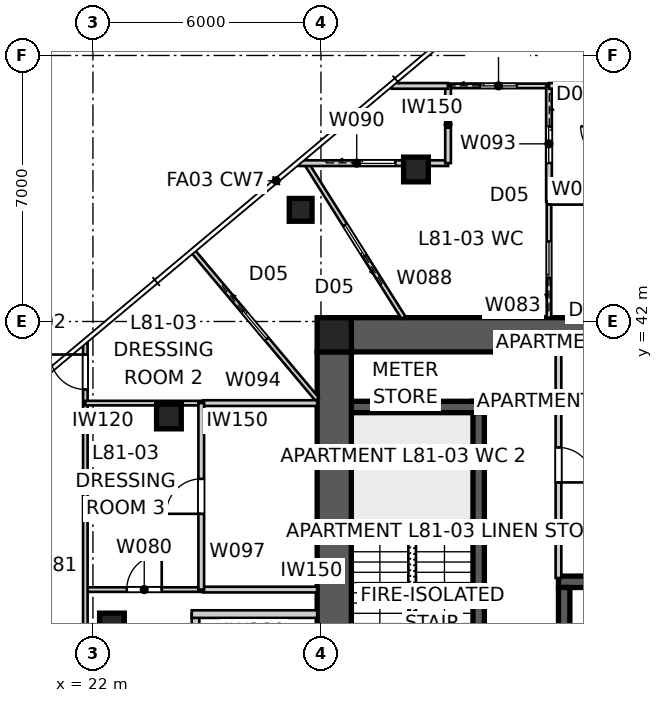
"""IFC4 building model, lengths in metres.
Left out: names, types, materials, properties, quantities, classifications, styles, units other than length and angle.
Written with IfcOpenShell. Run it as: python <this file> out.ifc"""

import sys

from ifc_helpers import new_model, si_unit, direction, frame, frame_2d, origin, origin_2d, place, context, subcontext, project, spatial, polyline, rectangle, outline, extrude, element, fill, save


model = new_model("IFC4")
c1 = context("Model", 3, precision=1e-05, world=origin(), true_north=direction((0.0, 1.0)))
c2 = subcontext(c1, "Body", "Model", "MODEL_VIEW")
j1 = project(units=[si_unit("LENGTHUNIT", "METRE"), si_unit("PLANEANGLEUNIT", "RADIAN")], contexts=[c1])
p1 = place(None, origin())
s1 = spatial("IfcSite", under=j1, at=p1, CompositionType="ELEMENT")
p2 = place(p1, origin())
s2 = spatial("IfcBuilding", under=s1, at=p2, CompositionType="ELEMENT")
p3 = place(p2, frame((0.0, 0.0, 293.0)))
s3 = spatial("IfcBuildingStorey", under=s2, at=p3, CompositionType="ELEMENT", Elevation=293.0)
p4 = place(p3, frame((28.8, 41.65, 0.0), z_axis=(0.0, 0.0, 1.0), x_axis=(1.0, 0.0, 0.0)))
e1 = element("IfcWall", 1, at=p4, inside=s3, PredefinedType="SHEAR", context=c2, shape_type="SweptSolid", body=[
    extrude(outline(polyline([(0.0, -0.45), (22.4, -0.45), (22.4, -0.025), (22.85, -0.025), (22.85, 0.025), (22.4, 0.025), (22.4, 0.45), (0.0, 0.45), (0.0, 0.025), (-0.45, 0.025), (-0.45, -0.025), (0.0, -0.025), (0.0, -0.45)])), origin(), (0.0, 0.0, 1.0), 3.4),
])
p5 = place(p3, frame((28.35, 41.2, 0.0), z_axis=(0.0, 0.0, 1.0), x_axis=(0.0, -1.0, 0.0)))
e2 = element("IfcWall", 2, at=p5, inside=s3, PredefinedType="SHEAR", context=c2, shape_type="SweptSolid", body=[
    extrude(outline(polyline([(0.0, -0.45), (22.4, -0.45), (22.4, -0.025), (22.85, -0.025), (22.85, 0.025), (22.4, 0.025), (22.4, 0.45), (0.0, 0.45), (0.0, 0.025), (-0.45, 0.025), (-0.45, -0.025), (0.0, -0.025), (0.0, -0.45)])), origin(), (0.0, 0.0, 1.0), 3.4),
])
p6 = place(p5, frame((11.14, 0.0, 0.0)))
e3 = element("IfcOpeningElement", 3, at=p6, cuts=e2, PredefinedType="OPENING", context=c2, shape_type="SweptSolid", body=[
    extrude(rectangle(XDim=1.02, YDim=2.4, at=frame_2d((0.51, 1.2))), frame((0.0, 0.46, 0.0), z_axis=(0.0, -1.0, 0.0), x_axis=(1.0, 0.0, 0.0)), (0.0, 0.0, 1.0), 0.92),
])
p7 = place(p3, frame((34.25, 35.15, 0.0), z_axis=(0.0, 0.0, 1.0), x_axis=(1.0, 0.0, 0.0)))
e4 = element("IfcWall", 4, at=p7, inside=s3, PredefinedType="SHEAR", context=c2, shape_type="SweptSolid", body=[
    extrude(rectangle(XDim=11.5, YDim=0.3, at=frame_2d((5.75, 0.0))), origin(), (0.0, 0.0, 1.0), 3.4),
])
p8 = place(p3, frame((34.4, 32.2, 0.0), z_axis=(0.0, 0.0, 1.0), x_axis=(0.0, 1.0, 0.0)))
e5 = element("IfcWall", 5, at=p8, inside=s3, PredefinedType="SHEAR", context=c2, shape_type="SweptSolid", body=[
    extrude(rectangle(XDim=2.8, YDim=0.3, at=frame_2d((1.4, 0.0))), origin(), (0.0, 0.0, 1.0), 3.4),
])
p9 = place(p3, frame((32.15, 32.2, 0.0), z_axis=(0.0, 0.0, 1.0), x_axis=(0.0, 1.0, 0.0)))
e6 = element("IfcWall", 6, at=p9, inside=s3, PredefinedType="SHEAR", context=c2, shape_type="SweptSolid", body=[
    extrude(rectangle(XDim=7.7, YDim=0.3, at=frame_2d((3.85, 0.0))), origin(), (0.0, 0.0, 1.0), 3.4),
])
p10 = place(p3, frame((28.8, 39.75, 0.0), z_axis=(0.0, 0.0, 1.0), x_axis=(1.0, 0.0, 0.0)))
e7 = element("IfcWall", 7, at=p10, inside=s3, PredefinedType="SHEAR", context=c2, shape_type="SweptSolid", body=[
    extrude(rectangle(XDim=3.5, YDim=0.3, at=frame_2d((1.75, 0.0))), origin(), (0.0, 0.0, 1.0), 3.4),
])
p11 = place(p3, frame((28.35, 41.65, 0.0), z_axis=(0.0, 0.0, 1.0), x_axis=(1.0, 0.0, 0.0)))
e8 = element("IfcColumn", 8, at=p11, inside=s3, PredefinedType="COLUMN", context=c2, shape_type="SweptSolid", body=[
    extrude(rectangle(XDim=0.9, YDim=0.9, at=origin_2d()), origin(), (0.0, 0.0, 1.0), 3.4),
])
p12 = place(p3, frame((27.466, 44.938, 0.0), z_axis=(0.0, 0.0, 1.0), x_axis=(1.0, 0.0, 0.0)))
e9 = element("IfcColumn", 9, at=p12, inside=s3, PredefinedType="COLUMN", context=c2, shape_type="SweptSolid", body=[
    extrude(rectangle(XDim=0.6, YDim=0.6, at=origin_2d()), origin(), (0.0, 0.0, 1.0), 3.4),
])
for number, where, z_axis, x_axis in (
    (10, (30.5, 46.0, 0.0), (0.0, 0.0, 1.0), (1.0, 0.0, 0.0)),
    (11, (24.0, 39.5, 0.0), (0.0, 0.0, 1.0), (1.0, 0.0, 0.0)),
    (12, (22.5, 34.0, 0.0), (0.0, 0.0, 1.0), (1.0, 0.0, 0.0)),
):
    element("IfcColumn", number, at=place(p3, frame(where, z_axis=z_axis, x_axis=x_axis)), inside=s3, PredefinedType="COLUMN", context=c2, shape_type="SweptSolid", body=[
        extrude(rectangle(XDim=0.65, YDim=0.65, at=origin_2d()), origin(), (0.0, 0.0, 1.0), 3.4),
    ])
p13 = place(p3, frame((24.7, 25.7, 0.0), z_axis=(0.0, 0.0, 1.0), x_axis=(0.0, 1.0, 0.0)))
e13 = element("IfcWall", 13, at=p13, inside=s3, PredefinedType="PARTITIONING", context=c2, shape_type="SweptSolid", body=[
    extrude(rectangle(XDim=8.6, YDim=0.2, at=frame_2d((4.3, 0.0))), origin(), (0.0, 0.0, 1.0), 3.25),
])
p14 = place(p13, frame((4.734, 0.0, 0.0)))
e14 = element("IfcOpeningElement", 14, at=p14, cuts=e13, PredefinedType="OPENING", context=c2, shape_type="SweptSolid", body=[
    extrude(rectangle(XDim=1.02, YDim=2.34, at=frame_2d((0.51, 1.17))), frame((0.0, 0.11, 0.0), z_axis=(0.0, -1.0, 0.0), x_axis=(1.0, 0.0, 0.0)), (0.0, 0.0, 1.0), 0.22),
])
p15 = place(p3, frame((27.9, 34.3, 0.0), z_axis=(0.0, 0.0, 1.0), x_axis=(-1.0, 0.0, 0.0)))
e15 = element("IfcWall", 15, at=p15, inside=s3, PredefinedType="PARTITIONING", context=c2, shape_type="SweptSolid", body=[
    extrude(rectangle(XDim=3.3, YDim=0.2, at=frame_2d((1.65, 0.0))), origin(), (0.0, 0.0, 1.0), 3.25),
])
p16 = place(p3, frame((34.25, 41.2, 0.0), z_axis=(0.0, 0.0, 1.0), x_axis=(0.0, -1.0, 0.0)))
e16 = element("IfcWall", 16, at=p16, inside=s3, PredefinedType="SOLIDWALL", context=c2, shape_type="SweptSolid", body=[
    extrude(rectangle(XDim=5.95, YDim=0.15, at=frame_2d((2.975, 0.0))), origin(), (0.0, 0.0, 1.0), 3.25),
])
p17 = place(p16, frame((2.515, 0.0, 0.0)))
e17 = element("IfcOpeningElement", 17, at=p17, cuts=e16, PredefinedType="OPENING", context=c2, shape_type="SweptSolid", body=[
    extrude(rectangle(XDim=0.92, YDim=2.1, at=frame_2d((0.46, 1.05))), frame((0.0, 0.085, 0.0), z_axis=(0.0, -1.0, 0.0), x_axis=(1.0, 0.0, 0.0)), (0.0, 0.0, 1.0), 0.17),
])
p18 = place(p3, frame((24.9, 34.945, 0.0), z_axis=(0.0, 0.0, 1.0), x_axis=(1.0, 0.0, 0.0)))
e18 = element("IfcWall", 18, at=p18, inside=s3, PredefinedType="SOLIDWALL", context=c2, shape_type="SweptSolid", body=[
    extrude(rectangle(XDim=3.0, YDim=0.15, at=frame_2d((1.5, 0.0))), origin(), (0.0, 0.0, 1.0), 3.25),
])
p19 = place(p3, frame((21.8, 34.945, 0.0), z_axis=(0.0, 0.0, 1.0), x_axis=(1.0, 0.0, 0.0)))
e19 = element("IfcWall", 19, at=p19, inside=s3, PredefinedType="PARTITIONING", context=c2, shape_type="SweptSolid", body=[
    extrude(rectangle(XDim=3.1, YDim=0.12, at=frame_2d((1.55, 0.0))), origin(), (0.0, 0.0, 1.0), 3.25),
])
p20 = place(p19, frame((1.09, 0.0, 0.0)))
e20 = element("IfcOpeningElement", 20, at=p20, cuts=e19, PredefinedType="OPENING", context=c2, shape_type="SweptSolid", body=[
    extrude(rectangle(XDim=0.92, YDim=2.34, at=frame_2d((0.46, 1.17))), frame((0.0, 0.07, 0.0), z_axis=(0.0, -1.0, 0.0), x_axis=(1.0, 0.0, 0.0)), (0.0, 0.0, 1.0), 0.14),
])
p21 = place(p3, frame((21.8, 25.498, 0.0), z_axis=(0.0, 0.0, 1.0), x_axis=(0.0, 1.0, 0.0)))
e21 = element("IfcWall", 21, at=p21, inside=s3, PredefinedType="PARTITIONING", context=c2, shape_type="SweptSolid", body=[
    extrude(rectangle(XDim=15.939, YDim=0.12, at=frame_2d((7.969, 0.0))), origin(), (0.0, 0.0, 1.0), 3.25),
])
p22 = place(p21, frame((4.486, 0.0, 0.0)))
e22 = element("IfcOpeningElement", 22, at=p22, cuts=e21, PredefinedType="OPENING", context=c2, shape_type="SweptSolid", body=[
    extrude(rectangle(XDim=0.92, YDim=2.34, at=frame_2d((0.46, 1.17))), frame((0.0, 0.07, 0.0), z_axis=(0.0, -1.0, 0.0), x_axis=(1.0, 0.0, 0.0)), (0.0, 0.0, 1.0), 0.14),
])
p23 = place(p21, frame((14.713, 0.0, 0.0)))
e23 = element("IfcOpeningElement", 23, at=p23, cuts=e21, PredefinedType="OPENING", context=c2, shape_type="SweptSolid", body=[
    extrude(rectangle(XDim=0.92, YDim=2.34, at=frame_2d((0.46, 1.17))), frame((0.0, 0.07, 0.0), z_axis=(0.0, -1.0, 0.0), x_axis=(1.0, 0.0, 0.0)), (0.0, 0.0, 1.0), 0.14),
])
p24 = place(p3, frame((34.0, 42.1, 0.0), z_axis=(0.0, 0.0, 1.0), x_axis=(0.0, 1.0, 0.0)))
e24 = element("IfcWall", 24, at=p24, inside=s3, PredefinedType="PARTITIONING", context=c2, shape_type="SweptSolid", body=[
    extrude(rectangle(XDim=3.05, YDim=0.12, at=frame_2d((1.525, 0.0))), origin(), (0.0, 0.0, 1.0), 3.25),
])
p25 = place(p24, frame((1.045, 0.0, 0.0)))
e25 = element("IfcOpeningElement", 25, at=p25, cuts=e24, PredefinedType="OPENING", context=c2, shape_type="SweptSolid", body=[
    extrude(rectangle(XDim=0.96, YDim=2.1, at=frame_2d((0.48, 1.05))), frame((0.0, 0.07, 0.0), z_axis=(0.0, -1.0, 0.0), x_axis=(1.0, 0.0, 0.0)), (0.0, 0.0, 1.0), 0.14),
])
p26 = place(p3, frame((34.0, 45.15, 0.0), z_axis=(0.0, 0.0, 1.0), x_axis=(1.0, 0.0, 0.0)))
e26 = element("IfcWall", 26, at=p26, inside=s3, PredefinedType="SOLIDWALL", context=c2, shape_type="SweptSolid", body=[
    extrude(rectangle(XDim=1.703, YDim=0.15, at=frame_2d((0.852, 0.0))), origin(), (0.0, 0.0, 1.0), 3.25),
])
p27 = place(p3, frame((30.172, 42.1, 0.0), z_axis=(0.0, 0.0, 1.0), x_axis=(-0.532913303443, 0.846169847616, 0.0)))
e27 = element("IfcWall", 27, at=p27, inside=s3, PredefinedType="PARTITIONING", context=c2, shape_type="SweptSolid", body=[
    extrude(rectangle(XDim=4.919, YDim=0.12, at=frame_2d((2.46, 0.0))), origin(), (0.0, 0.0, 1.0), 3.25),
])
p28 = place(p27, frame((1.923, 0.0, 0.0)))
e28 = element("IfcOpeningElement", 28, at=p28, cuts=e27, PredefinedType="OPENING", context=c2, shape_type="SweptSolid", body=[
    extrude(rectangle(XDim=0.96, YDim=2.1, at=frame_2d((0.48, 1.05))), frame((0.0, 0.07, 0.0), z_axis=(0.0, -1.0, 0.0), x_axis=(1.0, 0.0, 0.0)), (0.0, 0.0, 1.0), 0.14),
])
p29 = place(p3, frame((31.344, 48.2, 0.0), z_axis=(0.0, 0.0, 1.0), x_axis=(1.0, 0.0, 0.0)))
e29 = element("IfcWall", 29, at=p29, inside=s3, PredefinedType="PARTITIONING", context=c2, shape_type="SweptSolid", body=[
    extrude(rectangle(XDim=2.656, YDim=0.12, at=frame_2d((1.328, 0.0))), origin(), (0.0, 0.0, 1.0), 3.25),
])
p30 = place(p29, frame((0.848, 0.0, 0.0)))
e30 = element("IfcOpeningElement", 30, at=p30, cuts=e29, PredefinedType="OPENING", context=c2, shape_type="SweptSolid", body=[
    extrude(rectangle(XDim=0.96, YDim=2.1, at=frame_2d((0.48, 1.05))), frame((0.0, 0.07, 0.0), z_axis=(0.0, -1.0, 0.0), x_axis=(1.0, 0.0, 0.0)), (0.0, 0.0, 1.0), 0.14),
])
p31 = place(p3, frame((27.414, 46.167, 0.0), z_axis=(0.0, 0.0, 1.0), x_axis=(1.0, 0.0, 0.0)))
e31 = element("IfcWall", 31, at=p31, inside=s3, PredefinedType="SOLIDWALL", context=c2, shape_type="SweptSolid", body=[
    extrude(rectangle(XDim=3.053, YDim=0.15, at=frame_2d((1.526, 0.0))), origin(), (0.0, 0.0, 1.0), 3.25),
])
p32 = place(p31, frame((1.583, 0.0, 0.0)))
e32 = element("IfcOpeningElement", 32, at=p32, cuts=e31, PredefinedType="OPENING", context=c2, shape_type="SweptSolid", body=[
    extrude(rectangle(XDim=0.96, YDim=2.1, at=frame_2d((0.48, 1.05))), frame((0.0, 0.085, 0.0), z_axis=(0.0, -1.0, 0.0), x_axis=(1.0, 0.0, 0.0)), (0.0, 0.0, 1.0), 0.17),
])
p33 = place(p3, frame((30.467, 46.167, 0.0), z_axis=(0.0, 0.0, 1.0), x_axis=(1.0, 0.0, 0.0)))
e33 = element("IfcWall", 33, at=p33, inside=s3, PredefinedType="SOLIDWALL", context=c2, shape_type="SweptSolid", body=[
    extrude(rectangle(XDim=0.877, YDim=0.15, at=frame_2d((0.438, 0.0))), origin(), (0.0, 0.0, 1.0), 2.549),
])
p34 = place(p3, frame((31.344, 46.167, 0.0), z_axis=(0.0, 0.0, 1.0), x_axis=(0.0, 1.0, 0.0)))
e34 = element("IfcWall", 34, at=p34, inside=s3, PredefinedType="SOLIDWALL", context=c2, shape_type="SweptSolid", body=[
    extrude(rectangle(XDim=2.033, YDim=0.15, at=frame_2d((1.017, 0.0))), origin(), (0.0, 0.0, 1.0), 3.25),
])
p35 = place(p3, frame((34.0, 48.2, 0.0), z_axis=(0.0, 0.0, 1.0), x_axis=(0.0, -1.0, 0.0)))
e35 = element("IfcWall", 35, at=p35, inside=s3, PredefinedType="SOLIDWALL", context=c2, shape_type="SweptSolid", body=[
    extrude(rectangle(XDim=3.05, YDim=0.15, at=frame_2d((1.525, 0.0))), origin(), (0.0, 0.0, 1.0), 3.25),
])
p36 = place(p35, frame((1.07, 0.0, 0.0)))
e36 = element("IfcOpeningElement", 36, at=p36, cuts=e35, PredefinedType="OPENING", context=c2, shape_type="SweptSolid", body=[
    extrude(rectangle(XDim=0.96, YDim=2.1, at=frame_2d((0.48, 1.05))), frame((0.0, 0.085, 0.0), z_axis=(0.0, -1.0, 0.0), x_axis=(1.0, 0.0, 0.0)), (0.0, 0.0, 1.0), 0.17),
])
p37 = place(p3, frame((24.65, 43.828, 0.0), z_axis=(0.0, 0.0, 1.0), x_axis=(0.64277866568, -0.766051947943, 0.0)))
e37 = element("IfcWall", 37, at=p37, inside=s3, PredefinedType="PARTITIONING", context=c2, shape_type="SweptSolid", body=[
    extrude(rectangle(XDim=5.056, YDim=0.12, at=frame_2d((2.528, 0.0))), origin(), (0.0, 0.0, 1.0), 3.25),
])
p38 = place(p37, frame((2.028, 0.0, 0.0)))
e38 = element("IfcOpeningElement", 38, at=p38, cuts=e37, PredefinedType="OPENING", context=c2, shape_type="SweptSolid", body=[
    extrude(rectangle(XDim=0.96, YDim=2.1, at=frame_2d((0.48, 1.05))), frame((0.0, 0.07, 0.0), z_axis=(0.0, -1.0, 0.0), x_axis=(1.0, 0.0, 0.0)), (0.0, 0.0, 1.0), 0.14),
])
p39 = place(p3, frame((27.9, 39.852, 0.0), z_axis=(0.0, 0.0, 1.0), x_axis=(-1.0, 0.0, 0.0)))
e39 = element("IfcWall", 39, at=p39, inside=s3, PredefinedType="SOLIDWALL", context=c2, shape_type="SweptSolid", body=[
    extrude(rectangle(XDim=3.0, YDim=0.15, at=frame_2d((1.5, 0.0))), origin(), (0.0, 0.0, 1.0), 3.25),
])
p40 = place(p3, frame((24.9, 39.852, 0.0), z_axis=(0.0, 0.0, 1.0), x_axis=(-1.0, 0.0, 0.0)))
e40 = element("IfcWall", 40, at=p40, inside=s3, PredefinedType="PARTITIONING", context=c2, shape_type="SweptSolid", body=[
    extrude(rectangle(XDim=3.1, YDim=0.12, at=frame_2d((1.55, 0.0))), origin(), (0.0, 0.0, 1.0), 3.25),
])
p41 = place(p3, frame((24.85, 34.945, 0.0), z_axis=(0.0, 0.0, 1.0), x_axis=(0.0, 1.0, 0.0)))
e41 = element("IfcWall", 41, at=p41, inside=s3, PredefinedType="SOLIDWALL", context=c2, shape_type="SweptSolid", body=[
    extrude(rectangle(XDim=4.907, YDim=0.15, at=frame_2d((2.454, 0.0))), origin(), (0.0, 0.0, 1.0), 3.25),
])
p42 = place(p41, frame((1.994, 0.0, 0.0)))
e42 = element("IfcOpeningElement", 42, at=p42, cuts=e41, PredefinedType="OPENING", context=c2, shape_type="SweptSolid", body=[
    extrude(rectangle(XDim=0.92, YDim=2.34, at=frame_2d((0.46, 1.17))), frame((0.0, 0.085, 0.0), z_axis=(0.0, -1.0, 0.0), x_axis=(1.0, 0.0, 0.0)), (0.0, 0.0, 1.0), 0.17),
])
p43 = place(p3, frame((31.344, 48.2, 0.0), z_axis=(0.0, 0.0, 1.0), x_axis=(-1.0, 0.0, 0.0)))
e43 = element("IfcWall", 43, at=p43, inside=s3, PredefinedType="SOLIDWALL", context=c2, shape_type="SweptSolid", body=[
    extrude(rectangle(XDim=1.484, YDim=0.15, at=frame_2d((0.742, 0.0))), origin(), (0.0, 0.0, 1.0), 3.25),
])
p44 = place(p3, frame((35.754, 48.2, 0.0), z_axis=(0.0, 0.0, 1.0), x_axis=(-1.0, 0.0, 0.0)))
e44 = element("IfcWall", 44, at=p44, inside=s3, PredefinedType="SOLIDWALL", context=c2, shape_type="SweptSolid", body=[
    extrude(rectangle(XDim=1.753, YDim=0.15, at=frame_2d((0.877, 0.0))), origin(), (0.0, 0.0, 1.0), 3.25),
])
p45 = place(p17, origin())
e45 = element("IfcDoor", 45, at=p45, inside=s3, OperationType="SINGLE_SWING_RIGHT", PredefinedType="DOOR", context=c2, shape_type="SweptSolid", body=[
    extrude(rectangle(XDim=0.92, YDim=2.1, at=frame_2d((0.46, 1.05))), frame((0.0, 0.025, 0.0), z_axis=(0.0, -1.0, 0.0), x_axis=(1.0, 0.0, 0.0)), (0.0, 0.0, 1.0), 0.05),
])
fill(e17, e45)
p46 = place(p20, origin())
e46 = element("IfcDoor", 46, at=p46, inside=s3, OperationType="SINGLE_SWING_RIGHT", PredefinedType="DOOR", context=c2, shape_type="SweptSolid", body=[
    extrude(rectangle(XDim=0.92, YDim=2.34, at=frame_2d((0.46, 1.17))), frame((0.0, 0.025, 0.0), z_axis=(0.0, -1.0, 0.0), x_axis=(1.0, 0.0, 0.0)), (0.0, 0.0, 1.0), 0.05),
])
fill(e20, e46)
p47 = place(p23, origin())
e47 = element("IfcDoor", 47, at=p47, inside=s3, OperationType="SINGLE_SWING_RIGHT", PredefinedType="DOOR", context=c2, shape_type="SweptSolid", body=[
    extrude(rectangle(XDim=0.92, YDim=2.34, at=frame_2d((0.46, 1.17))), frame((0.0, 0.025, 0.0), z_axis=(0.0, -1.0, 0.0), x_axis=(1.0, 0.0, 0.0)), (0.0, 0.0, 1.0), 0.05),
])
fill(e23, e47)
p48 = place(p42, origin())
e48 = element("IfcDoor", 48, at=p48, inside=s3, OperationType="SINGLE_SWING_LEFT", PredefinedType="DOOR", context=c2, shape_type="SweptSolid", body=[
    extrude(rectangle(XDim=0.92, YDim=2.34, at=frame_2d((0.46, 1.17))), frame((0.0, 0.025, 0.0), z_axis=(0.0, -1.0, 0.0), x_axis=(1.0, 0.0, 0.0)), (0.0, 0.0, 1.0), 0.05),
])
fill(e42, e48)
p49 = place(p38, origin())
e49 = element("IfcDoor", 49, at=p49, inside=s3, OperationType="SLIDING_TO_LEFT", PredefinedType="DOOR", context=c2, shape_type="SweptSolid", body=[
    extrude(rectangle(XDim=0.96, YDim=2.1, at=frame_2d((0.48, 1.05))), frame((0.0, 0.025, 0.0), z_axis=(0.0, -1.0, 0.0), x_axis=(1.0, 0.0, 0.0)), (0.0, 0.0, 1.0), 0.05),
])
fill(e38, e49)
p50 = place(p28, origin())
e50 = element("IfcDoor", 50, at=p50, inside=s3, OperationType="SLIDING_TO_LEFT", PredefinedType="DOOR", context=c2, shape_type="SweptSolid", body=[
    extrude(rectangle(XDim=0.96, YDim=2.1, at=frame_2d((0.48, 1.05))), frame((0.0, 0.025, 0.0), z_axis=(0.0, -1.0, 0.0), x_axis=(1.0, 0.0, 0.0)), (0.0, 0.0, 1.0), 0.05),
])
fill(e28, e50)
p51 = place(p32, origin())
e51 = element("IfcDoor", 51, at=p51, inside=s3, OperationType="SLIDING_TO_LEFT", PredefinedType="DOOR", context=c2, shape_type="SweptSolid", body=[
    extrude(rectangle(XDim=0.96, YDim=2.1, at=frame_2d((0.48, 1.05))), frame((0.0, 0.025, 0.0), z_axis=(0.0, -1.0, 0.0), x_axis=(1.0, 0.0, 0.0)), (0.0, 0.0, 1.0), 0.05),
])
fill(e32, e51)
p52 = place(p36, origin())
e52 = element("IfcDoor", 52, at=p52, inside=s3, OperationType="SLIDING_TO_LEFT", PredefinedType="DOOR", context=c2, shape_type="SweptSolid", body=[
    extrude(rectangle(XDim=0.96, YDim=2.1, at=frame_2d((0.48, 1.05))), frame((0.0, 0.025, 0.0), z_axis=(0.0, -1.0, 0.0), x_axis=(1.0, 0.0, 0.0)), (0.0, 0.0, 1.0), 0.05),
])
fill(e36, e52)
p53 = place(p25, origin())
e53 = element("IfcDoor", 53, at=p53, inside=s3, OperationType="SLIDING_TO_LEFT", PredefinedType="DOOR", context=c2, shape_type="SweptSolid", body=[
    extrude(rectangle(XDim=0.96, YDim=2.1, at=frame_2d((0.48, 1.05))), frame((0.0, 0.025, 0.0), z_axis=(0.0, -1.0, 0.0), x_axis=(1.0, 0.0, 0.0)), (0.0, 0.0, 1.0), 0.05),
])
fill(e25, e53)
p54 = place(p30, origin())
e54 = element("IfcDoor", 54, at=p54, inside=s3, OperationType="SLIDING_TO_LEFT", PredefinedType="DOOR", context=c2, shape_type="SweptSolid", body=[
    extrude(rectangle(XDim=0.96, YDim=2.1, at=frame_2d((0.48, 1.05))), frame((0.0, 0.025, 0.0), z_axis=(0.0, -1.0, 0.0), x_axis=(1.0, 0.0, 0.0)), (0.0, 0.0, 1.0), 0.05),
])
fill(e30, e54)
save(model, sys.argv[1])
